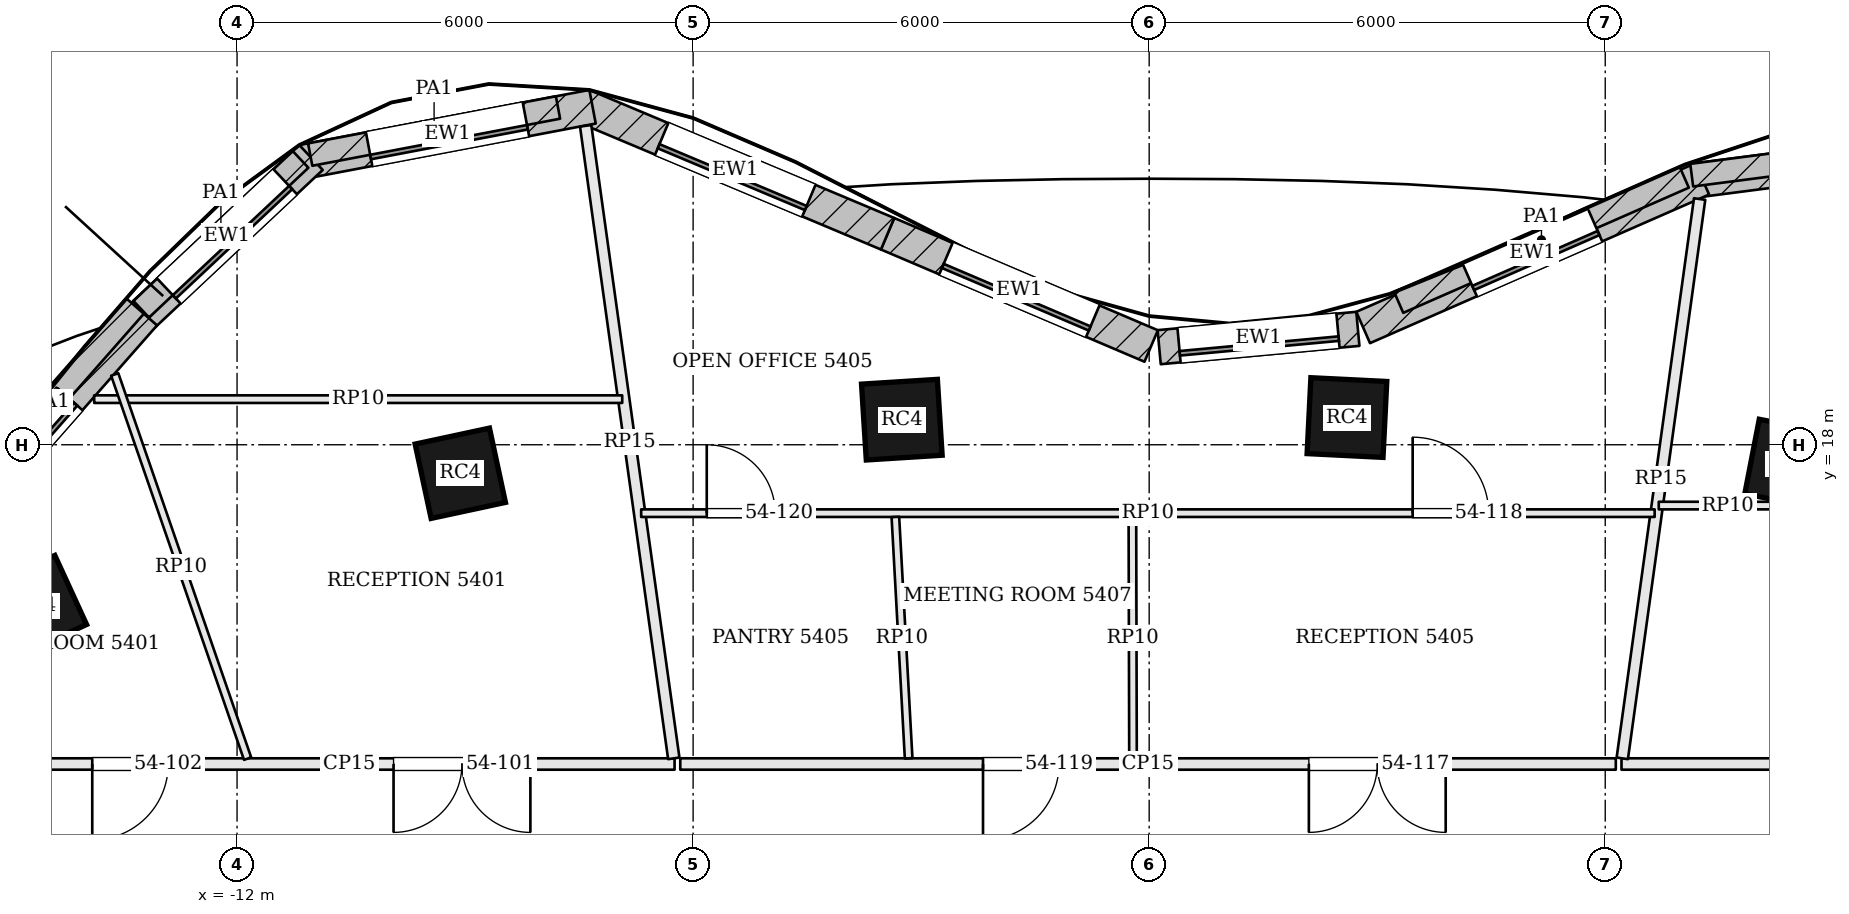
"""IFC4 building model, lengths in metres.
Left out: names, types, materials, properties, quantities, classifications, styles, units other than length and angle.
Written with IfcOpenShell. Run it as: python <this file> out.ifc"""

import sys

from ifc_helpers import new_model, si_unit, direction, frame, frame_2d, origin, origin_2d, place, context, subcontext, project, spatial, rectangle, extrude, element, fill, save


model = new_model("IFC4")
c1 = context("Model", 3, precision=1e-05, world=origin(), true_north=direction((0.0, 1.0)))
c2 = subcontext(c1, "Body", "Model", "MODEL_VIEW")
j1 = project(units=[si_unit("LENGTHUNIT", "METRE"), si_unit("PLANEANGLEUNIT", "RADIAN")], contexts=[c1])
p1 = place(None, origin())
s1 = spatial("IfcSite", under=j1, at=p1, CompositionType="ELEMENT")
p2 = place(p1, origin())
s2 = spatial("IfcBuilding", under=s1, at=p2, CompositionType="ELEMENT")
p3 = place(p2, frame((0.0, 0.0, 221.4)))
s3 = spatial("IfcBuildingStorey", under=s2, at=p3, CompositionType="ELEMENT", Elevation=221.4)
for number, where, z_axis, x_axis in (
    (1, (8.422, 17.749, 0.0), (0.0, 0.0, 1.0), (-0.982, 0.191, 0.0)),
    (2, (2.602, 18.358, 0.0), (0.0, 0.0, 1.0), (-0.999, 0.05, 0.0)),
    (3, (-3.254, 18.33, 0.0), (0.0, 0.0, 1.0), (-0.998, -0.063, 0.0)),
    (4, (-9.063, 17.625, 0.0), (0.0, 0.0, 1.0), (-0.978, -0.21, 0.0)),
    (5, (-14.643, 15.881, 0.0), (0.0, 0.0, 1.0), (-0.909, -0.417, 0.0)),
):
    element("IfcColumn", number, at=place(p3, frame(where, z_axis=z_axis, x_axis=x_axis)), inside=s3, PredefinedType="COLUMN", context=c2, shape_type="SweptSolid", body=[
        extrude(rectangle(XDim=1.0, YDim=1.0, at=origin_2d()), origin(), (0.0, 0.0, 1.0), 3.9),
    ])
p4 = place(p3, frame((11.362, 22.018, 0.0), z_axis=(0.0, 0.0, 1.0), x_axis=(-0.991724958022, -0.128380713645, 0.0)))
e6 = element("IfcWall", 6, at=p4, inside=s3, PredefinedType="SOLIDWALL", context=c2, shape_type="SweptSolid", body=[
    extrude(rectangle(XDim=4.182, YDim=0.45, at=frame_2d((2.091, 0.0))), origin(), (0.0, 0.0, 1.0), 3.7),
])
p5 = place(p4, frame((1.041, 0.0, 0.9)))
e7 = element("IfcOpeningElement", 7, at=p5, cuts=e6, PredefinedType="OPENING", context=c2, shape_type="SweptSolid", body=[
    extrude(rectangle(XDim=2.1, YDim=2.3, at=frame_2d((1.05, 1.15))), frame((0.0, 0.235, 0.0), z_axis=(0.0, -1.0, 0.0), x_axis=(1.0, 0.0, 0.0)), (0.0, 0.0, 1.0), 0.47),
])
p6 = place(p3, frame((7.276, 21.498, 0.0), z_axis=(0.0, 0.0, 1.0), x_axis=(-0.915872941312, -0.401468249519, 0.0)))
e8 = element("IfcWall", 8, at=p6, inside=s3, PredefinedType="SOLIDWALL", context=c2, shape_type="SweptSolid", body=[
    extrude(rectangle(XDim=4.87, YDim=0.45, at=frame_2d((2.435, 0.0))), origin(), (0.0, 0.0, 1.0), 3.7),
])
p7 = place(p6, frame((1.535, 0.0, 0.9)))
e9 = element("IfcOpeningElement", 9, at=p7, cuts=e8, PredefinedType="OPENING", context=c2, shape_type="SweptSolid", body=[
    extrude(rectangle(XDim=1.8, YDim=2.3, at=frame_2d((0.9, 1.15))), frame((0.0, 0.235, 0.0), z_axis=(0.0, -1.0, 0.0), x_axis=(1.0, 0.0, 0.0)), (0.0, 0.0, 1.0), 0.47),
])
p8 = place(p3, frame((2.745, 19.525, 0.0), z_axis=(0.0, 0.0, 1.0), x_axis=(-0.995768774275, -0.091894222771, 0.0)))
e10 = element("IfcWall", 10, at=p8, inside=s3, PredefinedType="SOLIDWALL", context=c2, shape_type="SweptSolid", body=[
    extrude(rectangle(XDim=2.625, YDim=0.45, at=frame_2d((1.312, 0.0))), origin(), (0.0, 0.0, 1.0), 3.7),
])
p9 = place(p8, frame((0.262, 0.0, 0.9)))
e11 = element("IfcOpeningElement", 11, at=p9, cuts=e10, PredefinedType="OPENING", context=c2, shape_type="SweptSolid", body=[
    extrude(rectangle(XDim=2.1, YDim=2.3, at=frame_2d((1.05, 1.15))), frame((0.0, 0.235, 0.0), z_axis=(0.0, -1.0, 0.0), x_axis=(1.0, 0.0, 0.0)), (0.0, 0.0, 1.0), 0.47),
])
p10 = place(p3, frame((0.026, 19.299, 0.0), z_axis=(0.0, 0.0, 1.0), x_axis=(-0.920040408927, 0.391823488245, 0.0)))
e12 = element("IfcWall", 12, at=p10, inside=s3, PredefinedType="SOLIDWALL", context=c2, shape_type="SweptSolid", body=[
    extrude(rectangle(XDim=3.77, YDim=0.45, at=frame_2d((1.885, 0.0))), origin(), (0.0, 0.0, 1.0), 3.7),
])
p11 = place(p10, frame((0.835, 0.0, 0.9)))
e13 = element("IfcOpeningElement", 13, at=p11, cuts=e12, PredefinedType="OPENING", context=c2, shape_type="SweptSolid", body=[
    extrude(rectangle(XDim=2.1, YDim=2.3, at=frame_2d((1.05, 1.15))), frame((0.0, 0.235, 0.0), z_axis=(0.0, -1.0, 0.0), x_axis=(1.0, 0.0, 0.0)), (0.0, 0.0, 1.0), 0.47),
])
p12 = place(p3, frame((-3.441, 20.776, 0.0), z_axis=(0.0, 0.0, 1.0), x_axis=(-0.921988121387, 0.387218160758, 0.0)))
e14 = element("IfcWall", 14, at=p12, inside=s3, PredefinedType="SOLIDWALL", context=c2, shape_type="SweptSolid", body=[
    extrude(rectangle(XDim=4.347, YDim=0.45, at=frame_2d((2.173, 0.0))), origin(), (0.0, 0.0, 1.0), 3.7),
])
p13 = place(p12, frame((1.123, 0.0, 0.9)))
e15 = element("IfcOpeningElement", 15, at=p13, cuts=e14, PredefinedType="OPENING", context=c2, shape_type="SweptSolid", body=[
    extrude(rectangle(XDim=2.1, YDim=2.3, at=frame_2d((1.05, 1.15))), frame((0.0, 0.235, 0.0), z_axis=(0.0, -1.0, 0.0), x_axis=(1.0, 0.0, 0.0)), (0.0, 0.0, 1.0), 0.47),
])
p14 = place(p3, frame((-7.323, 22.447, 0.0), z_axis=(0.0, 0.0, 1.0), x_axis=(-0.982420993638, -0.18667884524, 0.0)))
e16 = element("IfcWall", 16, at=p14, inside=s3, PredefinedType="SOLIDWALL", context=c2, shape_type="SweptSolid", body=[
    extrude(rectangle(XDim=3.884, YDim=0.45, at=frame_2d((1.942, 0.0))), origin(), (0.0, 0.0, 1.0), 3.7),
])
p15 = place(p14, frame((0.892, 0.0, 0.9)))
e17 = element("IfcOpeningElement", 17, at=p15, cuts=e16, PredefinedType="OPENING", context=c2, shape_type="SweptSolid", body=[
    extrude(rectangle(XDim=2.1, YDim=2.3, at=frame_2d((1.05, 1.15))), frame((0.0, 0.235, 0.0), z_axis=(0.0, -1.0, 0.0), x_axis=(1.0, 0.0, 0.0)), (0.0, 0.0, 1.0), 0.47),
])
p16 = place(p3, frame((-11.027, 21.779, 0.0), z_axis=(0.0, 0.0, 1.0), x_axis=(-0.728871214251, -0.684650825631, 0.0)))
e18 = element("IfcWall", 18, at=p16, inside=s3, PredefinedType="SOLIDWALL", context=c2, shape_type="SweptSolid", body=[
    extrude(rectangle(XDim=3.031, YDim=0.45, at=frame_2d((1.516, 0.0))), origin(), (0.0, 0.0, 1.0), 3.7),
])
p17 = place(p16, frame((0.466, 0.0, 0.9)))
e19 = element("IfcOpeningElement", 19, at=p17, cuts=e18, PredefinedType="OPENING", context=c2, shape_type="SweptSolid", body=[
    extrude(rectangle(XDim=2.1, YDim=2.3, at=frame_2d((1.05, 1.15))), frame((0.0, 0.235, 0.0), z_axis=(0.0, -1.0, 0.0), x_axis=(1.0, 0.0, 0.0)), (0.0, 0.0, 1.0), 0.47),
])
p18 = place(p3, frame((-13.221, 19.719, 0.0), z_axis=(0.0, 0.0, 1.0), x_axis=(-0.660424908916, -0.750892095899, 0.0)))
e20 = element("IfcWall", 20, at=p18, inside=s3, PredefinedType="SOLIDWALL", context=c2, shape_type="SweptSolid", body=[
    extrude(rectangle(XDim=5.071, YDim=0.45, at=frame_2d((2.535, 0.0))), origin(), (0.0, 0.0, 1.0), 3.7),
])
p19 = place(p18, frame((1.485, 0.0, 0.9)))
e21 = element("IfcOpeningElement", 21, at=p19, cuts=e20, PredefinedType="OPENING", context=c2, shape_type="SweptSolid", body=[
    extrude(rectangle(XDim=2.1, YDim=2.3, at=frame_2d((1.05, 1.15))), frame((0.0, 0.235, 0.0), z_axis=(0.0, -1.0, 0.0), x_axis=(1.0, 0.0, 0.0)), (0.0, 0.0, 1.0), 0.47),
])
p20 = place(p3, frame((11.214, 22.074, 3.9), z_axis=(0.0, 0.0, 1.0), x_axis=(-0.991727449614, -0.128361464939, 0.0)))
e22 = element("IfcWall", 22, at=p20, inside=s3, PredefinedType="PARAPET", context=c2, shape_type="SweptSolid", body=[
    extrude(rectangle(XDim=4.11, YDim=0.3, at=frame_2d((2.055, 0.0))), origin(), (0.0, 0.0, 1.0), 1.1),
])
p21 = place(p3, frame((7.039, 21.519, 3.9), z_axis=(0.0, 0.0, 1.0), x_axis=(-0.915890739732, -0.401427643384, 0.0)))
e23 = element("IfcWall", 23, at=p21, inside=s3, PredefinedType="PARAPET", context=c2, shape_type="SweptSolid", body=[
    extrude(rectangle(XDim=4.102, YDim=0.3, at=frame_2d((2.051, 0.0))), origin(), (0.0, 0.0, 1.0), 1.1),
])
p22 = place(p3, frame((-7.778, 22.437, 3.9), z_axis=(0.0, 0.0, 1.0), x_axis=(-0.98241446716, -0.186713188382, 0.0)))
e24 = element("IfcWall", 24, at=p22, inside=s3, PredefinedType="PARAPET", context=c2, shape_type="SweptSolid", body=[
    extrude(rectangle(XDim=3.319, YDim=0.3, at=frame_2d((1.659, 0.0))), origin(), (0.0, 0.0, 1.0), 1.1),
])
p23 = place(p3, frame((-11.164, 21.753, 3.9), z_axis=(0.0, 0.0, 1.0), x_axis=(-0.72886475222, -0.684657704967, 0.0)))
e25 = element("IfcWall", 25, at=p23, inside=s3, PredefinedType="PARAPET", context=c2, shape_type="SweptSolid", body=[
    extrude(rectangle(XDim=2.877, YDim=0.3, at=frame_2d((1.438, 0.0))), origin(), (0.0, 0.0, 1.0), 1.1),
])
p24 = place(p3, frame((-13.339, 19.822, 3.9), z_axis=(0.0, 0.0, 1.0), x_axis=(-0.660445690116, -0.7508738179, 0.0)))
e26 = element("IfcWall", 26, at=p24, inside=s3, PredefinedType="PARAPET", context=c2, shape_type="SweptSolid", body=[
    extrude(rectangle(XDim=3.353, YDim=0.3, at=frame_2d((1.677, 0.0))), origin(), (0.0, 0.0, 1.0), 1.1),
])
p25 = place(p3, frame((-6.244, 13.8, 0.0), z_axis=(0.0, 0.0, 1.0), x_axis=(-1.0, 0.0, 0.0)))
e27 = element("IfcWall", 27, at=p25, inside=s3, PredefinedType="PARTITIONING", context=c2, shape_type="SweptSolid", body=[
    extrude(rectangle(XDim=8.556, YDim=0.15, at=frame_2d((4.278, 0.0))), origin(), (0.0, 0.0, 1.0), 3.084),
])
p26 = place(p25, frame((1.897, 0.0, 0.0)))
e28 = element("IfcOpeningElement", 28, at=p26, cuts=e27, PredefinedType="OPENING", context=c2, shape_type="SweptSolid", body=[
    extrude(rectangle(XDim=1.8, YDim=2.1, at=frame_2d((0.9, 1.05))), frame((0.0, 0.085, 0.0), z_axis=(0.0, -1.0, 0.0), x_axis=(1.0, 0.0, 0.0)), (0.0, 0.0, 1.0), 0.17),
])
p27 = place(p25, frame((6.661, 0.0, 0.0)))
e29 = element("IfcOpeningElement", 29, at=p27, cuts=e27, PredefinedType="OPENING", context=c2, shape_type="SweptSolid", body=[
    extrude(rectangle(XDim=1.0, YDim=2.4, at=frame_2d((0.5, 1.2))), frame((0.0, 0.085, 0.0), z_axis=(0.0, -1.0, 0.0), x_axis=(1.0, 0.0, 0.0)), (0.0, 0.0, 1.0), 0.17),
])
p28 = place(p3, frame((-7.414, 22.196, 0.0), z_axis=(0.0, 0.0, 1.0), x_axis=(0.137962708722, -0.990437424072, 0.0)))
e30 = element("IfcWall", 30, at=p28, inside=s3, PredefinedType="PARTITIONING", context=c2, shape_type="SweptSolid", body=[
    extrude(rectangle(XDim=8.402, YDim=0.15, at=frame_2d((4.201, 0.0))), origin(), (0.0, 0.0, 1.0), 3.234),
])
p29 = place(p3, frame((14.725, 13.8, 0.0), z_axis=(0.0, 0.0, 1.0), x_axis=(-1.0, 0.0, 0.0)))
e31 = element("IfcWall", 31, at=p29, inside=s3, PredefinedType="PARTITIONING", context=c2, shape_type="SweptSolid", body=[
    extrude(rectangle(XDim=8.511, YDim=0.15, at=frame_2d((4.255, 0.0))), origin(), (0.0, 0.0, 1.0), 3.084),
])
p30 = place(p29, frame((4.95, 0.0, 0.0)))
e32 = element("IfcOpeningElement", 32, at=p30, cuts=e31, PredefinedType="OPENING", context=c2, shape_type="SweptSolid", body=[
    extrude(rectangle(XDim=1.0, YDim=2.1, at=frame_2d((0.5, 1.05))), frame((0.0, 0.085, 0.0), z_axis=(0.0, -1.0, 0.0), x_axis=(1.0, 0.0, 0.0)), (0.0, 0.0, 1.0), 0.17),
])
p31 = place(p3, frame((7.242, 21.233, 0.0), z_axis=(0.0, 0.0, 1.0), x_axis=(-0.136979917761, -0.990573824674, 0.0)))
e33 = element("IfcWall", 33, at=p31, inside=s3, PredefinedType="PARTITIONING", context=c2, shape_type="SweptSolid", body=[
    extrude(rectangle(XDim=7.429, YDim=0.15, at=frame_2d((3.714, 0.0))), origin(), (0.0, 0.0, 1.0), 3.234),
])
p32 = place(p3, frame((6.139, 13.8, 0.0), z_axis=(0.0, 0.0, 1.0), x_axis=(-1.0, 0.0, 0.0)))
e34 = element("IfcWall", 34, at=p32, inside=s3, PredefinedType="PARTITIONING", context=c2, shape_type="SweptSolid", body=[
    extrude(rectangle(XDim=12.308, YDim=0.15, at=frame_2d((6.154, 0.0))), origin(), (0.0, 0.0, 1.0), 3.084),
])
p33 = place(p32, frame((2.238, 0.0, 0.0)))
e35 = element("IfcOpeningElement", 35, at=p33, cuts=e34, PredefinedType="OPENING", context=c2, shape_type="SweptSolid", body=[
    extrude(rectangle(XDim=1.8, YDim=2.1, at=frame_2d((0.9, 1.05))), frame((0.0, 0.085, 0.0), z_axis=(0.0, -1.0, 0.0), x_axis=(1.0, 0.0, 0.0)), (0.0, 0.0, 1.0), 0.17),
])
p34 = place(p32, frame((7.325, 0.0, 0.0)))
e36 = element("IfcOpeningElement", 36, at=p34, cuts=e34, PredefinedType="OPENING", context=c2, shape_type="SweptSolid", body=[
    extrude(rectangle(XDim=1.0, YDim=2.4, at=frame_2d((0.5, 1.2))), frame((0.0, 0.085, 0.0), z_axis=(0.0, -1.0, 0.0), x_axis=(1.0, 0.0, 0.0)), (0.0, 0.0, 1.0), 0.17),
])
p35 = place(p3, frame((-13.88, 18.6, 0.0), z_axis=(0.0, 0.0, 1.0), x_axis=(1.0, 0.0, 0.0)))
e37 = element("IfcWall", 37, at=p35, inside=s3, PredefinedType="PARTITIONING", context=c2, shape_type="SweptSolid", body=[
    extrude(rectangle(XDim=6.947, YDim=0.1, at=frame_2d((3.473, 0.0))), origin(), (0.0, 0.0, 1.0), 3.084),
])
p36 = place(p3, frame((-11.861, 13.871, 0.0), z_axis=(0.0, 0.0, 1.0), x_axis=(-0.326836144326, 0.945081020211, 0.0)))
e38 = element("IfcWall", 38, at=p36, inside=s3, PredefinedType="PARTITIONING", context=c2, shape_type="SweptSolid", body=[
    extrude(rectangle(XDim=5.348, YDim=0.1, at=frame_2d((2.674, 0.0))), origin(), (0.0, 0.0, 1.0), 3.084),
])
p37 = place(p3, frame((6.704, 17.2, 0.0), z_axis=(0.0, 0.0, 1.0), x_axis=(1.0, 0.0, 0.0)))
e39 = element("IfcWall", 39, at=p37, inside=s3, PredefinedType="PARTITIONING", context=c2, shape_type="SweptSolid", body=[
    extrude(rectangle(XDim=1.817, YDim=0.1, at=frame_2d((0.908, 0.0))), origin(), (0.0, 0.0, 1.0), 3.084),
])
p38 = place(p3, frame((-6.684, 17.1, 0.0), z_axis=(0.0, 0.0, 1.0), x_axis=(1.0, 0.0, 0.0)))
e40 = element("IfcWall", 40, at=p38, inside=s3, PredefinedType="PARTITIONING", context=c2, shape_type="SweptSolid", body=[
    extrude(rectangle(XDim=13.334, YDim=0.1, at=frame_2d((6.667, 0.0))), origin(), (0.0, 0.0, 1.0), 3.084),
])
p39 = place(p38, frame((10.15, 0.0, 0.0)))
e41 = element("IfcOpeningElement", 41, at=p39, cuts=e40, PredefinedType="OPENING", context=c2, shape_type="SweptSolid", body=[
    extrude(rectangle(XDim=1.0, YDim=2.1, at=frame_2d((0.5, 1.05))), frame((0.0, 0.06, 0.0), z_axis=(0.0, -1.0, 0.0), x_axis=(1.0, 0.0, 0.0)), (0.0, 0.0, 1.0), 0.12),
])
p40 = place(p38, frame((0.863, 0.0, 0.0)))
e42 = element("IfcOpeningElement", 42, at=p40, cuts=e40, PredefinedType="OPENING", context=c2, shape_type="SweptSolid", body=[
    extrude(rectangle(XDim=0.9, YDim=2.1, at=frame_2d((0.45, 1.05))), frame((0.0, 0.06, 0.0), z_axis=(0.0, -1.0, 0.0), x_axis=(1.0, 0.0, 0.0)), (0.0, 0.0, 1.0), 0.12),
])
p41 = place(p3, frame((-0.213, 13.875, 0.0), z_axis=(0.0, 0.0, 1.0), x_axis=(-0.002537477413, 0.999996780599, 0.0)))
e43 = element("IfcWall", 43, at=p41, inside=s3, PredefinedType="PARTITIONING", context=c2, shape_type="SweptSolid", body=[
    extrude(rectangle(XDim=3.175, YDim=0.1, at=frame_2d((1.587, 0.0))), origin(), (0.0, 0.0, 1.0), 3.084),
])
p42 = place(p3, frame((-3.165, 13.875, 0.0), z_axis=(0.0, 0.0, 1.0), x_axis=(-0.054895950594, 0.998492080393, 0.0)))
e44 = element("IfcWall", 44, at=p42, inside=s3, PredefinedType="PARTITIONING", context=c2, shape_type="SweptSolid", body=[
    extrude(rectangle(XDim=3.18, YDim=0.1, at=frame_2d((1.59, 0.0))), origin(), (0.0, 0.0, 1.0), 3.084),
])
p43 = place(p7, origin())
e45 = element("IfcWindow", 45, at=p43, inside=s3, PartitioningType="SINGLE_PANEL", PredefinedType="WINDOW", context=c2, shape_type="SweptSolid", body=[
    extrude(rectangle(XDim=1.8, YDim=2.3, at=frame_2d((0.9, 1.15))), frame((0.0, 0.135, 0.0), z_axis=(0.0, -1.0, 0.0), x_axis=(1.0, 0.0, 0.0)), (0.0, 0.0, 1.0), 0.06),
])
fill(e9, e45)
p44 = place(p9, origin())
e46 = element("IfcWindow", 46, at=p44, inside=s3, PartitioningType="SINGLE_PANEL", PredefinedType="WINDOW", context=c2, shape_type="SweptSolid", body=[
    extrude(rectangle(XDim=2.1, YDim=2.3, at=frame_2d((1.05, 1.15))), frame((0.0, 0.135, 0.0), z_axis=(0.0, -1.0, 0.0), x_axis=(1.0, 0.0, 0.0)), (0.0, 0.0, 1.0), 0.06),
])
fill(e11, e46)
p45 = place(p11, origin())
e47 = element("IfcWindow", 47, at=p45, inside=s3, PartitioningType="SINGLE_PANEL", PredefinedType="WINDOW", context=c2, shape_type="SweptSolid", body=[
    extrude(rectangle(XDim=2.1, YDim=2.3, at=frame_2d((1.05, 1.15))), frame((0.0, 0.135, 0.0), z_axis=(0.0, -1.0, 0.0), x_axis=(1.0, 0.0, 0.0)), (0.0, 0.0, 1.0), 0.06),
])
fill(e13, e47)
p46 = place(p13, origin())
e48 = element("IfcWindow", 48, at=p46, inside=s3, PartitioningType="SINGLE_PANEL", PredefinedType="WINDOW", context=c2, shape_type="SweptSolid", body=[
    extrude(rectangle(XDim=2.1, YDim=2.3, at=frame_2d((1.05, 1.15))), frame((0.0, 0.135, 0.0), z_axis=(0.0, -1.0, 0.0), x_axis=(1.0, 0.0, 0.0)), (0.0, 0.0, 1.0), 0.06),
])
fill(e15, e48)
p47 = place(p15, origin())
e49 = element("IfcWindow", 49, at=p47, inside=s3, PartitioningType="SINGLE_PANEL", PredefinedType="WINDOW", context=c2, shape_type="SweptSolid", body=[
    extrude(rectangle(XDim=2.1, YDim=2.3, at=frame_2d((1.05, 1.15))), frame((0.0, 0.135, 0.0), z_axis=(0.0, -1.0, 0.0), x_axis=(1.0, 0.0, 0.0)), (0.0, 0.0, 1.0), 0.06),
])
fill(e17, e49)
p48 = place(p17, origin())
e50 = element("IfcWindow", 50, at=p48, inside=s3, PartitioningType="SINGLE_PANEL", PredefinedType="WINDOW", context=c2, shape_type="SweptSolid", body=[
    extrude(rectangle(XDim=2.1, YDim=2.3, at=frame_2d((1.05, 1.15))), frame((0.0, 0.135, 0.0), z_axis=(0.0, -1.0, 0.0), x_axis=(1.0, 0.0, 0.0)), (0.0, 0.0, 1.0), 0.06),
])
fill(e19, e50)
p49 = place(p19, origin())
e51 = element("IfcWindow", 51, at=p49, inside=s3, PartitioningType="SINGLE_PANEL", PredefinedType="WINDOW", context=c2, shape_type="SweptSolid", body=[
    extrude(rectangle(XDim=2.1, YDim=2.3, at=frame_2d((1.05, 1.15))), frame((0.0, 0.135, 0.0), z_axis=(0.0, -1.0, 0.0), x_axis=(1.0, 0.0, 0.0)), (0.0, 0.0, 1.0), 0.06),
])
fill(e21, e51)
p50 = place(p26, origin())
e52 = element("IfcDoor", 52, at=p50, inside=s3, OperationType="DOUBLE_DOOR_SINGLE_SWING", PredefinedType="DOOR", context=c2, shape_type="SweptSolid", body=[
    extrude(rectangle(XDim=1.8, YDim=2.1, at=frame_2d((0.9, 1.05))), frame((0.0, 0.025, 0.0), z_axis=(0.0, -1.0, 0.0), x_axis=(1.0, 0.0, 0.0)), (0.0, 0.0, 1.0), 0.05),
])
fill(e28, e52)
p51 = place(p27, origin())
e53 = element("IfcDoor", 53, at=p51, inside=s3, OperationType="SINGLE_SWING_RIGHT", PredefinedType="DOOR", context=c2, shape_type="SweptSolid", body=[
    extrude(rectangle(XDim=1.0, YDim=2.4, at=frame_2d((0.5, 1.2))), frame((0.0, 0.025, 0.0), z_axis=(0.0, -1.0, 0.0), x_axis=(1.0, 0.0, 0.0)), (0.0, 0.0, 1.0), 0.05),
])
fill(e29, e53)
p52 = place(p33, origin())
e54 = element("IfcDoor", 54, at=p52, inside=s3, OperationType="DOUBLE_DOOR_SINGLE_SWING", PredefinedType="DOOR", context=c2, shape_type="SweptSolid", body=[
    extrude(rectangle(XDim=1.8, YDim=2.1, at=frame_2d((0.9, 1.05))), frame((0.0, 0.025, 0.0), z_axis=(0.0, -1.0, 0.0), x_axis=(1.0, 0.0, 0.0)), (0.0, 0.0, 1.0), 0.05),
])
fill(e35, e54)
p53 = place(p39, origin())
e55 = element("IfcDoor", 55, at=p53, inside=s3, OperationType="SINGLE_SWING_LEFT", PredefinedType="DOOR", context=c2, shape_type="SweptSolid", body=[
    extrude(rectangle(XDim=1.0, YDim=2.1, at=frame_2d((0.5, 1.05))), frame((0.0, 0.025, 0.0), z_axis=(0.0, -1.0, 0.0), x_axis=(1.0, 0.0, 0.0)), (0.0, 0.0, 1.0), 0.05),
])
fill(e41, e55)
p54 = place(p34, origin())
e56 = element("IfcDoor", 56, at=p54, inside=s3, OperationType="SINGLE_SWING_RIGHT", PredefinedType="DOOR", context=c2, shape_type="SweptSolid", body=[
    extrude(rectangle(XDim=1.0, YDim=2.4, at=frame_2d((0.5, 1.2))), frame((0.0, 0.025, 0.0), z_axis=(0.0, -1.0, 0.0), x_axis=(1.0, 0.0, 0.0)), (0.0, 0.0, 1.0), 0.05),
])
fill(e36, e56)
p55 = place(p40, origin())
e57 = element("IfcDoor", 57, at=p55, inside=s3, OperationType="SINGLE_SWING_LEFT", PredefinedType="DOOR", context=c2, shape_type="SweptSolid", body=[
    extrude(rectangle(XDim=0.9, YDim=2.1, at=frame_2d((0.45, 1.05))), frame((0.0, 0.025, 0.0), z_axis=(0.0, -1.0, 0.0), x_axis=(1.0, 0.0, 0.0)), (0.0, 0.0, 1.0), 0.05),
])
fill(e42, e57)
save(model, sys.argv[1])
